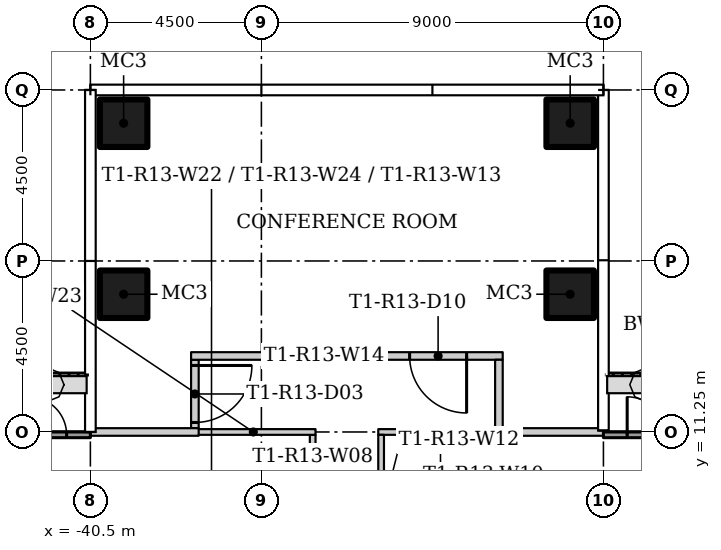
"""IFC4 building model, lengths in metres.
Left out: names, types, materials, properties, quantities, classifications, styles, units other than length and angle.
Written with IfcOpenShell. Run it as: python <this file> out.ifc"""

import sys

from ifc_helpers import new_model, si_unit, direction, frame, frame_2d, origin, origin_2d, place, context, subcontext, project, spatial, rectangle, hollow_rectangle, extrude, element, fill, save


model = new_model("IFC4")
c1 = context("Model", 3, precision=1e-05, world=origin(), true_north=direction((0.0, 1.0)))
c2 = subcontext(c1, "Body", "Model", "MODEL_VIEW")
j1 = project(units=[si_unit("LENGTHUNIT", "METRE"), si_unit("PLANEANGLEUNIT", "RADIAN")], contexts=[c1])
p1 = place(None, origin())
s1 = spatial("IfcSite", under=j1, at=p1, CompositionType="ELEMENT")
p2 = place(p1, origin())
s2 = spatial("IfcBuilding", under=s1, at=p2, CompositionType="ELEMENT")
p3 = place(p2, frame((0.0, 0.0, 120.9)))
s3 = spatial("IfcBuildingStorey", under=s2, at=p3, CompositionType="ELEMENT", Elevation=120.9)
for number, where in (
    (1, (-39.625, 14.875, 0.0)),
    (2, (-39.625, 19.375, 0.0)),
    (3, (-27.875, 14.875, 0.0)),
    (4, (-27.875, 19.375, 0.0)),
):
    element("IfcColumn", number, at=place(p3, frame(where)), inside=s3, PredefinedType="COLUMN", context=c2, shape_type="SweptSolid", body=[
        extrude(hollow_rectangle(XDim=1.25, YDim=1.25, WallThickness=0.05, at=origin_2d()), origin(), (0.0, 0.0, 1.0), 3.55),
    ])
p4 = place(p3, frame((-34.65, 6.825, 0.0), z_axis=(0.0, 0.0, 1.0), x_axis=(0.0, 1.0, 0.0)))
e5 = element("IfcWall", 5, at=p4, inside=s3, PredefinedType="PARTITIONING", context=c2, shape_type="SweptSolid", body=[
    extrude(rectangle(XDim=4.35, YDim=0.15, at=frame_2d((2.175, 0.0))), origin(), (0.0, 0.0, 1.0), 3.55),
])
p5 = place(p4, frame((1.425, 0.0, 0.0)))
e6 = element("IfcOpeningElement", 6, at=p5, cuts=e5, PredefinedType="OPENING", context=c2, shape_type="SweptSolid", body=[
    extrude(rectangle(XDim=1.5, YDim=2.1, at=frame_2d((0.75, 1.05))), frame((0.0, 0.085, 0.0), z_axis=(0.0, -1.0, 0.0), x_axis=(1.0, 0.0, 0.0)), (0.0, 0.0, 1.0), 0.17),
])
for number, where, z_axis, x_axis in (
    (7, (-29.65, 11.25, 0.0), (0.0, 0.0, 1.0), (-1.0, 0.0, 0.0)),
    (8, (-34.575, 11.25, 0.0), (0.0, 0.0, 1.0), (-1.0, 0.0, 0.0)),
):
    element("IfcWall", number, at=place(p3, frame(where, z_axis=z_axis, x_axis=x_axis)), inside=s3, PredefinedType="PARTITIONING", context=c2, shape_type="SweptSolid", body=[
        extrude(rectangle(XDim=3.275, YDim=0.15, at=frame_2d((1.637, 0.0))), origin(), (0.0, 0.0, 1.0), 3.55),
    ])
p6 = place(p3, frame((-32.85, 11.175, 0.0), z_axis=(0.0, 0.0, 1.0), x_axis=(0.0, -1.0, 0.0)))
e9 = element("IfcWall", 9, at=p6, inside=s3, PredefinedType="PARTITIONING", context=c2, shape_type="SweptSolid", body=[
    extrude(rectangle(XDim=4.35, YDim=0.15, at=frame_2d((2.175, 0.0))), origin(), (0.0, 0.0, 1.0), 3.55),
])
p7 = place(p6, frame((1.675, 0.0, 0.0)))
e10 = element("IfcOpeningElement", 10, at=p7, cuts=e9, PredefinedType="OPENING", context=c2, shape_type="SweptSolid", body=[
    extrude(rectangle(XDim=1.0, YDim=2.4, at=frame_2d((0.5, 1.2))), frame((0.0, 0.085, 0.0), z_axis=(0.0, -1.0, 0.0), x_axis=(1.0, 0.0, 0.0)), (0.0, 0.0, 1.0), 0.17),
])
p8 = place(p3, frame((-37.75, 13.15, 0.0), z_axis=(0.0, 0.0, 1.0), x_axis=(0.0, -1.0, 0.0)))
e11 = element("IfcWall", 11, at=p8, inside=s3, PredefinedType="PARTITIONING", context=c2, shape_type="SweptSolid", body=[
    extrude(rectangle(XDim=1.8, YDim=0.2, at=frame_2d((0.9, 0.0))), origin(), (0.0, 0.0, 1.0), 3.55),
])
p9 = place(p8, frame((0.15, 0.0, 0.0)))
e12 = element("IfcOpeningElement", 12, at=p9, cuts=e11, PredefinedType="OPENING", context=c2, shape_type="SweptSolid", body=[
    extrude(rectangle(XDim=1.5, YDim=2.4, at=frame_2d((0.75, 1.2))), frame((0.0, 0.11, 0.0), z_axis=(0.0, -1.0, 0.0), x_axis=(1.0, 0.0, 0.0)), (0.0, 0.0, 1.0), 0.22),
])
p10 = place(p3, frame((-29.65, 13.25, 0.0), z_axis=(0.0, 0.0, 1.0), x_axis=(-1.0, 0.0, 0.0)))
e13 = element("IfcWall", 13, at=p10, inside=s3, PredefinedType="PARTITIONING", context=c2, shape_type="SweptSolid", body=[
    extrude(rectangle(XDim=8.2, YDim=0.2, at=frame_2d((4.1, 0.0))), origin(), (0.0, 0.0, 1.0), 3.55),
])
p11 = place(p10, frame((0.95, 0.0, 0.0)))
e14 = element("IfcOpeningElement", 14, at=p11, cuts=e13, PredefinedType="OPENING", context=c2, shape_type="SweptSolid", body=[
    extrude(rectangle(XDim=1.5, YDim=2.4, at=frame_2d((0.75, 1.2))), frame((0.0, 0.11, 0.0), z_axis=(0.0, -1.0, 0.0), x_axis=(1.0, 0.0, 0.0)), (0.0, 0.0, 1.0), 0.22),
])
p12 = place(p3, frame((-29.75, 11.35, 0.0), z_axis=(0.0, 0.0, 1.0), x_axis=(0.0, 1.0, 0.0)))
e15 = element("IfcWall", 15, at=p12, inside=s3, PredefinedType="PARTITIONING", context=c2, shape_type="SweptSolid", body=[
    extrude(rectangle(XDim=1.8, YDim=0.2, at=frame_2d((0.9, 0.0))), origin(), (0.0, 0.0, 1.0), 3.55),
])
for number, where, z_axis, x_axis in (
    (16, (-27.0, 11.25, 0.0), (0.0, 0.0, 1.0), (-1.0, 0.0, 0.0)),
    (17, (-37.65, 11.25, 0.0), (0.0, 0.0, 1.0), (-1.0, 0.0, 0.0)),
):
    element("IfcWall", number, at=place(p3, frame(where, z_axis=z_axis, x_axis=x_axis)), inside=s3, PredefinedType="PARTITIONING", context=c2, shape_type="SweptSolid", body=[
        extrude(rectangle(XDim=2.85, YDim=0.2, at=frame_2d((1.425, 0.0))), origin(), (0.0, 0.0, 1.0), 3.55),
    ])
p13 = place(p3, frame((-27.0, 11.175, 0.0)))
e18 = element("IfcWall", 18, at=p13, inside=s3, PredefinedType="SOLIDWALL", context=c2, shape_type="SweptSolid", body=[
    extrude(rectangle(XDim=2.25, YDim=0.15, at=frame_2d((1.125, 0.0))), origin(), (0.0, 0.0, 1.0), 3.45),
])
p14 = place(p13, frame((0.625, 0.0, 0.0)))
e19 = element("IfcOpeningElement", 19, at=p14, cuts=e18, PredefinedType="OPENING", context=c2, shape_type="SweptSolid", body=[
    extrude(rectangle(XDim=1.0, YDim=2.4, at=frame_2d((0.5, 1.2))), frame((0.0, 0.085, 0.0), z_axis=(0.0, -1.0, 0.0), x_axis=(1.0, 0.0, 0.0)), (0.0, 0.0, 1.0), 0.17),
])
p15 = place(p3, frame((-42.75, 11.175, 0.0)))
e20 = element("IfcWall", 20, at=p15, inside=s3, PredefinedType="SOLIDWALL", context=c2, shape_type="SweptSolid", body=[
    extrude(rectangle(XDim=2.25, YDim=0.15, at=frame_2d((1.125, 0.0))), origin(), (0.0, 0.0, 1.0), 3.45),
])
p16 = place(p15, frame((0.625, 0.0, 0.0)))
e21 = element("IfcOpeningElement", 21, at=p16, cuts=e20, PredefinedType="OPENING", context=c2, shape_type="SweptSolid", body=[
    extrude(rectangle(XDim=1.0, YDim=2.4, at=frame_2d((0.5, 1.2))), frame((0.0, 0.085, 0.0), z_axis=(0.0, -1.0, 0.0), x_axis=(1.0, 0.0, 0.0)), (0.0, 0.0, 1.0), 0.17),
])
p17 = place(p9, origin())
e22 = element("IfcDoor", 22, at=p17, inside=s3, OperationType="DOUBLE_DOOR_SINGLE_SWING", PredefinedType="DOOR", context=c2, shape_type="SweptSolid", body=[
    extrude(rectangle(XDim=1.5, YDim=2.4, at=frame_2d((0.75, 1.2))), frame((0.0, 0.025, 0.0), z_axis=(0.0, -1.0, 0.0), x_axis=(1.0, 0.0, 0.0)), (0.0, 0.0, 1.0), 0.05),
])
fill(e12, e22)
p18 = place(p11, origin())
e23 = element("IfcDoor", 23, at=p18, inside=s3, OperationType="DOUBLE_DOOR_SINGLE_SWING", PredefinedType="DOOR", context=c2, shape_type="SweptSolid", body=[
    extrude(rectangle(XDim=1.5, YDim=2.4, at=frame_2d((0.75, 1.2))), frame((0.0, 0.025, 0.0), z_axis=(0.0, -1.0, 0.0), x_axis=(1.0, 0.0, 0.0)), (0.0, 0.0, 1.0), 0.05),
])
fill(e14, e23)
p19 = place(p14, origin())
e24 = element("IfcDoor", 24, at=p19, inside=s3, OperationType="SINGLE_SWING_LEFT", PredefinedType="DOOR", context=c2, shape_type="SweptSolid", body=[
    extrude(rectangle(XDim=1.0, YDim=2.4, at=frame_2d((0.5, 1.2))), frame((0.0, 0.025, 0.0), z_axis=(0.0, -1.0, 0.0), x_axis=(1.0, 0.0, 0.0)), (0.0, 0.0, 1.0), 0.05),
])
fill(e19, e24)
p20 = place(p16, origin())
e25 = element("IfcDoor", 25, at=p20, inside=s3, OperationType="SINGLE_SWING_LEFT", PredefinedType="DOOR", context=c2, shape_type="SweptSolid", body=[
    extrude(rectangle(XDim=1.0, YDim=2.4, at=frame_2d((0.5, 1.2))), frame((0.0, 0.025, 0.0), z_axis=(0.0, -1.0, 0.0), x_axis=(1.0, 0.0, 0.0)), (0.0, 0.0, 1.0), 0.05),
])
fill(e21, e25)
save(model, sys.argv[1])
